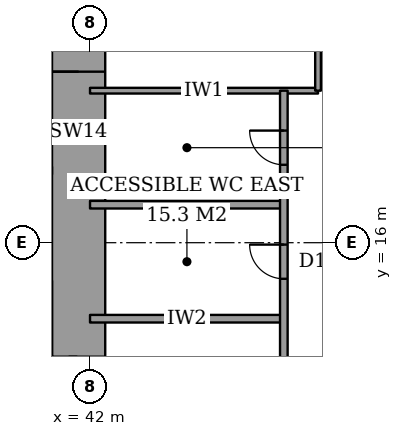
"""IFC4 building model, lengths in metres.
Left out: names, types, materials, properties, quantities, classifications, styles, units other than length and angle.
Written with IfcOpenShell. Run it as: python <this file> out.ifc"""

import sys

from ifc_helpers import new_model, si_unit, direction, frame, frame_2d, origin, place, context, subcontext, project, spatial, rectangle, extrude, element, fill, save


model = new_model("IFC4")
c1 = context("Model", 3, precision=1e-05, world=origin(), true_north=direction((0.0, 1.0)))
c2 = subcontext(c1, "Body", "Model", "MODEL_VIEW")
j1 = project(units=[si_unit("LENGTHUNIT", "METRE"), si_unit("PLANEANGLEUNIT", "RADIAN")], contexts=[c1])
p1 = place(None, origin())
s1 = spatial("IfcSite", under=j1, at=p1, CompositionType="ELEMENT")
p2 = place(p1, origin())
s2 = spatial("IfcBuilding", under=s1, at=p2, CompositionType="ELEMENT")
p3 = place(p2, origin())
s3 = spatial("IfcBuildingStorey", under=s2, at=p3, CompositionType="ELEMENT", Elevation=0.0)
p4 = place(p3, frame((41.7, 13.0, 0.0), z_axis=(0.0, 0.0, 1.0), x_axis=(0.0, 1.0, 0.0)))
e1 = element("IfcWall", 1, at=p4, inside=s3, PredefinedType="SHEAR", context=c2, shape_type="SweptSolid", body=[
    extrude(rectangle(XDim=11.85, YDim=1.4, at=frame_2d((5.925, 0.0))), origin(), (0.0, 0.0, 1.0), 6.0),
])
p5 = place(p4, frame((7.5, 0.0, 0.0)))
e2 = element("IfcOpeningElement", 2, at=p5, cuts=e1, PredefinedType="OPENING", context=c2, shape_type="SweptSolid", body=[
    extrude(rectangle(XDim=1.8, YDim=2.4, at=frame_2d((0.9, 1.2))), frame((0.0, 0.71, 0.0), z_axis=(0.0, -1.0, 0.0), x_axis=(1.0, 0.0, 0.0)), (0.0, 0.0, 1.0), 1.42),
])
for number, where, z_axis, x_axis in (
    (3, (42.0, 14.0, 0.0), (0.0, 0.0, 1.0), (1.0, 0.0, 0.0)),
    (4, (42.0, 17.0, 0.0), (0.0, 0.0, 1.0), (1.0, 0.0, 0.0)),
):
    element("IfcWall", number, at=place(p3, frame(where, z_axis=z_axis, x_axis=x_axis)), inside=s3, PredefinedType="PARTITIONING", context=c2, shape_type="SweptSolid", body=[
        extrude(rectangle(XDim=5.1, YDim=0.2, at=frame_2d((2.55, 0.0))), origin(), (0.0, 0.0, 1.0), 5.7),
    ])
p6 = place(p3, frame((42.0, 20.0, 0.0), z_axis=(0.0, 0.0, 1.0), x_axis=(1.0, 0.0, 0.0)))
e5 = element("IfcWall", 5, at=p6, inside=s3, PredefinedType="PARTITIONING", context=c2, shape_type="SweptSolid", body=[
    extrude(rectangle(XDim=6.0, YDim=0.15, at=frame_2d((3.0, 0.0))), origin(), (0.0, 0.0, 1.0), 5.7),
])
p7 = place(p3, frame((41.55, 9.3, 0.0), z_axis=(0.0, 0.0, 1.0), x_axis=(0.0, 1.0, 0.0)))
e6 = element("IfcWall", 6, at=p7, inside=s3, PredefinedType="PARTITIONING", context=c2, shape_type="SweptSolid", body=[
    extrude(rectangle(XDim=3.7, YDim=0.2, at=frame_2d((1.85, 0.0))), origin(), (0.0, 0.0, 1.0), 5.7),
])
p8 = place(p3, frame((47.1, 0.0, 0.0), z_axis=(0.0, 0.0, 1.0), x_axis=(0.0, 1.0, 0.0)))
e7 = element("IfcWall", 7, at=p8, inside=s3, PredefinedType="PARTITIONING", context=c2, shape_type="SweptSolid", body=[
    extrude(rectangle(XDim=20.0, YDim=0.2, at=frame_2d((10.0, 0.0))), origin(), (0.0, 0.0, 1.0), 5.7),
])
p9 = place(p8, frame((15.05, 0.0, 0.0)))
e8 = element("IfcOpeningElement", 8, at=p9, cuts=e7, PredefinedType="OPENING", context=c2, shape_type="SweptSolid", body=[
    extrude(rectangle(XDim=0.9, YDim=2.1, at=frame_2d((0.45, 1.05))), frame((0.0, 0.11, 0.0), z_axis=(0.0, -1.0, 0.0), x_axis=(1.0, 0.0, 0.0)), (0.0, 0.0, 1.0), 0.22),
])
p10 = place(p8, frame((18.05, 0.0, 0.0)))
e9 = element("IfcOpeningElement", 9, at=p10, cuts=e7, PredefinedType="OPENING", context=c2, shape_type="SweptSolid", body=[
    extrude(rectangle(XDim=0.9, YDim=2.1, at=frame_2d((0.45, 1.05))), frame((0.0, 0.11, 0.0), z_axis=(0.0, -1.0, 0.0), x_axis=(1.0, 0.0, 0.0)), (0.0, 0.0, 1.0), 0.22),
])
p11 = place(p3, frame((48.0, 20.0, 0.0), z_axis=(0.0, 0.0, 1.0), x_axis=(0.0, 1.0, 0.0)))
e10 = element("IfcWall", 10, at=p11, inside=s3, PredefinedType="PARTITIONING", context=c2, shape_type="SweptSolid", body=[
    extrude(rectangle(XDim=8.0, YDim=0.15, at=frame_2d((4.0, 0.0))), origin(), (0.0, 0.0, 1.0), 5.7),
])
p12 = place(p11, frame((1.5, 0.0, 0.0)))
e11 = element("IfcOpeningElement", 11, at=p12, cuts=e10, PredefinedType="OPENING", context=c2, shape_type="SweptSolid", body=[
    extrude(rectangle(XDim=1.0, YDim=2.1, at=frame_2d((0.5, 1.05))), frame((0.0, 0.085, 0.0), z_axis=(0.0, -1.0, 0.0), x_axis=(1.0, 0.0, 0.0)), (0.0, 0.0, 1.0), 0.17),
])
p13 = place(p3, frame((28.3, 17.9, 0.0), z_axis=(0.0, 0.0, 1.0), x_axis=(1.0, 0.0, 0.0)))
e12 = element("IfcWall", 12, at=p13, inside=s3, PredefinedType="PARTITIONING", context=c2, shape_type="SweptSolid", body=[
    extrude(rectangle(XDim=12.7, YDim=0.2, at=frame_2d((6.35, 0.0))), origin(), (0.0, 0.0, 1.0), 6.0),
])
p14 = place(p13, frame((0.95, 0.0, 0.0)))
e13 = element("IfcOpeningElement", 13, at=p14, cuts=e12, PredefinedType="OPENING", context=c2, shape_type="SweptSolid", body=[
    extrude(rectangle(XDim=1.1, YDim=2.1, at=frame_2d((0.55, 1.05))), frame((0.0, 0.11, 0.0), z_axis=(0.0, -1.0, 0.0), x_axis=(1.0, 0.0, 0.0)), (0.0, 0.0, 1.0), 0.22),
])
p15 = place(p13, frame((4.15, 0.0, 0.0)))
e14 = element("IfcOpeningElement", 14, at=p15, cuts=e12, PredefinedType="OPENING", context=c2, shape_type="SweptSolid", body=[
    extrude(rectangle(XDim=1.1, YDim=2.1, at=frame_2d((0.55, 1.05))), frame((0.0, 0.11, 0.0), z_axis=(0.0, -1.0, 0.0), x_axis=(1.0, 0.0, 0.0)), (0.0, 0.0, 1.0), 0.22),
])
p16 = place(p13, frame((7.35, 0.0, 0.0)))
e15 = element("IfcOpeningElement", 15, at=p16, cuts=e12, PredefinedType="OPENING", context=c2, shape_type="SweptSolid", body=[
    extrude(rectangle(XDim=1.1, YDim=2.1, at=frame_2d((0.55, 1.05))), frame((0.0, 0.11, 0.0), z_axis=(0.0, -1.0, 0.0), x_axis=(1.0, 0.0, 0.0)), (0.0, 0.0, 1.0), 0.22),
])
p17 = place(p13, frame((10.6, 0.0, 0.0)))
e16 = element("IfcOpeningElement", 16, at=p17, cuts=e12, PredefinedType="OPENING", context=c2, shape_type="SweptSolid", body=[
    extrude(rectangle(XDim=1.2, YDim=2.1, at=frame_2d((0.6, 1.05))), frame((0.0, 0.11, 0.0), z_axis=(0.0, -1.0, 0.0), x_axis=(1.0, 0.0, 0.0)), (0.0, 0.0, 1.0), 0.22),
])
p18 = place(p9, origin())
e17 = element("IfcDoor", 17, at=p18, inside=s3, OperationType="SINGLE_SWING_LEFT", PredefinedType="DOOR", context=c2, shape_type="SweptSolid", body=[
    extrude(rectangle(XDim=0.9, YDim=2.1, at=frame_2d((0.45, 1.05))), frame((0.0, 0.025, 0.0), z_axis=(0.0, -1.0, 0.0), x_axis=(1.0, 0.0, 0.0)), (0.0, 0.0, 1.0), 0.05),
])
fill(e8, e17)
p19 = place(p10, origin())
e18 = element("IfcDoor", 18, at=p19, inside=s3, OperationType="SINGLE_SWING_LEFT", PredefinedType="DOOR", context=c2, shape_type="SweptSolid", body=[
    extrude(rectangle(XDim=0.9, YDim=2.1, at=frame_2d((0.45, 1.05))), frame((0.0, 0.025, 0.0), z_axis=(0.0, -1.0, 0.0), x_axis=(1.0, 0.0, 0.0)), (0.0, 0.0, 1.0), 0.05),
])
fill(e9, e18)
p20 = place(p5, origin())
e19 = element("IfcDoor", 19, at=p20, inside=s3, OperationType="DOUBLE_DOOR_DOUBLE_SWING", PredefinedType="DOOR", context=c2, shape_type="SweptSolid", body=[
    extrude(rectangle(XDim=1.8, YDim=2.4, at=frame_2d((0.9, 1.2))), frame((0.0, 0.225, 0.0), z_axis=(0.0, -1.0, 0.0), x_axis=(1.0, 0.0, 0.0)), (0.0, 0.0, 1.0), 0.05),
])
fill(e2, e19)
save(model, sys.argv[1])
